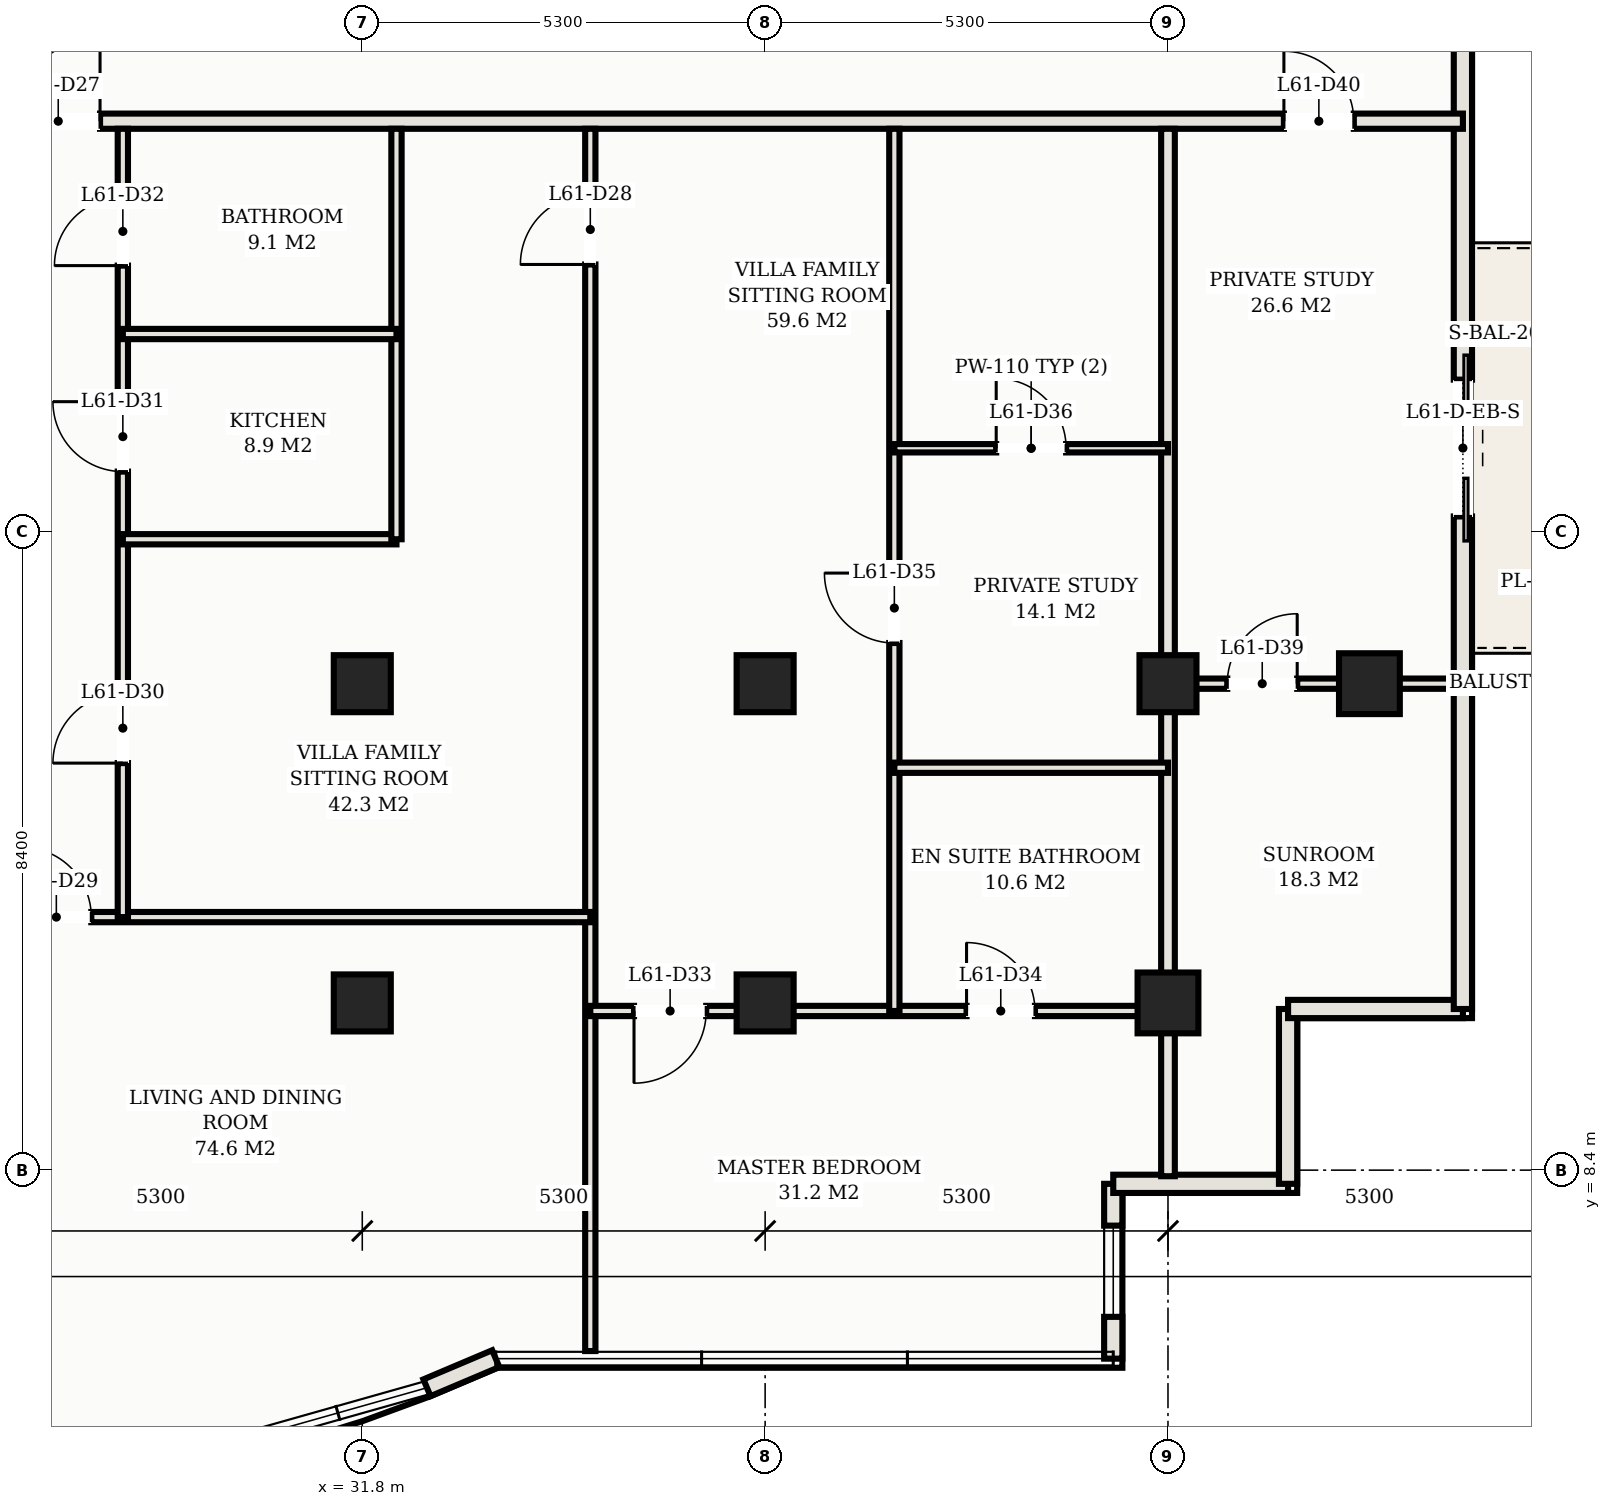
"""IFC4 building model, lengths in metres.
Left out: names, types, materials, properties, quantities, classifications, styles, units other than length and angle.
Written with IfcOpenShell. Run it as: python <this file> out.ifc"""

import sys

from ifc_helpers import new_model, si_unit, direction, frame, frame_2d, origin, origin_2d, place, context, subcontext, project, spatial, rectangle, hollow_rectangle, extrude, element, fill, save


model = new_model("IFC4")
c1 = context("Model", 3, precision=1e-05, world=origin(), true_north=direction((0.0, 1.0)))
c2 = subcontext(c1, "Body", "Model", "MODEL_VIEW")
j1 = project(units=[si_unit("LENGTHUNIT", "METRE"), si_unit("PLANEANGLEUNIT", "RADIAN")], contexts=[c1])
p1 = place(None, origin())
s1 = spatial("IfcSite", under=j1, at=p1, CompositionType="ELEMENT")
p2 = place(p1, origin())
s2 = spatial("IfcBuilding", under=s1, at=p2, CompositionType="ELEMENT")
p3 = place(p2, frame((0.0, 0.0, 223.1)))
s3 = spatial("IfcBuildingStorey", under=s2, at=p3, CompositionType="ELEMENT", Elevation=223.1)
for number, where, z_axis, x_axis in (
    (1, (31.8, 14.8, 0.0), (0.0, 0.0, 1.0), (1.0, 0.0, 0.0)),
    (2, (31.8, 10.6, 0.0), (0.0, 0.0, 1.0), (1.0, 0.0, 0.0)),
    (3, (37.1, 14.8, 0.0), (0.0, 0.0, 1.0), (1.0, 0.0, 0.0)),
    (4, (37.1, 10.6, 0.0), (0.0, 0.0, 1.0), (1.0, 0.0, 0.0)),
    (5, (42.4, 14.8, 0.0), (0.0, 0.0, 1.0), (1.0, 0.0, 0.0)),
):
    element("IfcColumn", number, at=place(p3, frame(where, z_axis=z_axis, x_axis=x_axis)), inside=s3, PredefinedType="COLUMN", context=c2, shape_type="SweptSolid", body=[
        extrude(hollow_rectangle(XDim=0.75, YDim=0.75, WallThickness=0.025, at=origin_2d()), origin(), (0.0, 0.0, 1.0), 3.3),
    ])
for number, where, z_axis, x_axis in (
    (6, (42.4, 10.6, 0.0), (0.0, 0.0, 1.0), (1.0, 0.0, 0.0)),
    (7, (45.05, 14.8, 0.0), (0.0, 0.0, 1.0), (1.0, 0.0, 0.0)),
):
    element("IfcColumn", number, at=place(p3, frame(where, z_axis=z_axis, x_axis=x_axis)), inside=s3, PredefinedType="COLUMN", context=c2, shape_type="SweptSolid", body=[
        extrude(hollow_rectangle(XDim=0.8, YDim=0.8, WallThickness=0.028, at=origin_2d()), origin(), (0.0, 0.0, 1.0), 3.3),
    ])
p4 = place(p3, frame((32.651, 5.537, 0.0), z_axis=(0.0, 0.0, 1.0), x_axis=(0.920998109395, 0.389567044924, 0.0)))
e8 = element("IfcWall", 8, at=p4, inside=s3, PredefinedType="SOLIDWALL", context=c2, shape_type="SweptSolid", body=[
    extrude(rectangle(XDim=0.983, YDim=0.24, at=frame_2d((0.491, 0.0))), origin(), (0.0, 0.0, 1.0), 3.11),
])
p5 = place(p3, frame((41.68, 5.92, 0.0), z_axis=(0.0, 0.0, 1.0), x_axis=(0.0, 1.0, 0.0)))
e9 = element("IfcWall", 9, at=p5, inside=s3, PredefinedType="SOLIDWALL", context=c2, shape_type="SweptSolid", body=[
    extrude(rectangle(XDim=2.3, YDim=0.24, at=frame_2d((1.15, 0.0))), origin(), (0.0, 0.0, 1.0), 3.11),
])
p6 = place(p5, frame((0.55, 0.0, 0.75)))
e10 = element("IfcOpeningElement", 10, at=p6, cuts=e9, PredefinedType="OPENING", context=c2, shape_type="SweptSolid", body=[
    extrude(rectangle(XDim=1.2, YDim=1.5, at=frame_2d((0.6, 0.75))), frame((0.0, 0.13, 0.0), z_axis=(0.0, -1.0, 0.0), x_axis=(1.0, 0.0, 0.0)), (0.0, 0.0, 1.0), 0.26),
])
for number, where, z_axis, x_axis in (
    (11, (41.68, 8.22, 0.0), (0.0, 0.0, 1.0), (1.0, 0.0, 0.0)),
    (12, (43.98, 8.22, 0.0), (0.0, 0.0, 1.0), (0.0, 1.0, 0.0)),
    (13, (43.98, 10.52, 0.0), (0.0, 0.0, 1.0), (1.0, 0.0, 0.0)),
):
    element("IfcWall", number, at=place(p3, frame(where, z_axis=z_axis, x_axis=x_axis)), inside=s3, PredefinedType="SOLIDWALL", context=c2, shape_type="SweptSolid", body=[
        extrude(rectangle(XDim=2.3, YDim=0.24, at=frame_2d((1.15, 0.0))), origin(), (0.0, 0.0, 1.0), 3.11),
    ])
p7 = place(p3, frame((46.28, 10.52, 0.0), z_axis=(0.0, 0.0, 1.0), x_axis=(0.0, 1.0, 0.0)))
e14 = element("IfcWall", 14, at=p7, inside=s3, PredefinedType="SOLIDWALL", context=c2, shape_type="SweptSolid", body=[
    extrude(rectangle(XDim=26.41, YDim=0.24, at=frame_2d((13.205, 0.0))), origin(), (0.0, 0.0, 1.0), 3.11),
])
p8 = place(p7, frame((6.48, 0.0, 0.0)))
e15 = element("IfcOpeningElement", 15, at=p8, cuts=e14, PredefinedType="OPENING", context=c2, shape_type="SweptSolid", body=[
    extrude(rectangle(XDim=1.8, YDim=2.2, at=frame_2d((0.9, 1.1))), frame((0.0, 0.13, 0.0), z_axis=(0.0, -1.0, 0.0), x_axis=(1.0, 0.0, 0.0)), (0.0, 0.0, 1.0), 0.26),
])
p9 = place(p3, frame((6.72, 22.2, 0.0), z_axis=(0.0, 0.0, 1.0), x_axis=(1.0, 0.0, 0.0)))
e16 = element("IfcWall", 16, at=p9, inside=s3, PredefinedType="PARTITIONING", context=c2, shape_type="SweptSolid", body=[
    extrude(rectangle(XDim=39.56, YDim=0.2, at=frame_2d((19.78, 0.0))), origin(), (0.0, 0.0, 1.0), 2.43),
])
p10 = place(p9, frame((4.63, 0.0, 0.0)))
e17 = element("IfcOpeningElement", 17, at=p10, cuts=e16, PredefinedType="OPENING", context=c2, shape_type="SweptSolid", body=[
    extrude(rectangle(XDim=1.1, YDim=2.25, at=frame_2d((0.55, 1.125))), frame((0.0, 0.11, 0.0), z_axis=(0.0, -1.0, 0.0), x_axis=(1.0, 0.0, 0.0)), (0.0, 0.0, 1.0), 0.22),
])
p11 = place(p9, frame((20.53, 0.0, 0.0)))
e18 = element("IfcOpeningElement", 18, at=p11, cuts=e16, PredefinedType="OPENING", context=c2, shape_type="SweptSolid", body=[
    extrude(rectangle(XDim=1.1, YDim=2.25, at=frame_2d((0.55, 1.125))), frame((0.0, 0.11, 0.0), z_axis=(0.0, -1.0, 0.0), x_axis=(1.0, 0.0, 0.0)), (0.0, 0.0, 1.0), 0.22),
])
p12 = place(p9, frame((1.435, 0.0, 0.0)))
e19 = element("IfcOpeningElement", 19, at=p12, cuts=e16, PredefinedType="OPENING", context=c2, shape_type="SweptSolid", body=[
    extrude(rectangle(XDim=0.92, YDim=2.15, at=frame_2d((0.46, 1.075))), frame((0.0, 0.11, 0.0), z_axis=(0.0, -1.0, 0.0), x_axis=(1.0, 0.0, 0.0)), (0.0, 0.0, 1.0), 0.22),
])
p13 = place(p9, frame((37.205, 0.0, 0.0)))
e20 = element("IfcOpeningElement", 20, at=p13, cuts=e16, PredefinedType="OPENING", context=c2, shape_type="SweptSolid", body=[
    extrude(rectangle(XDim=0.92, YDim=2.15, at=frame_2d((0.46, 1.075))), frame((0.0, 0.11, 0.0), z_axis=(0.0, -1.0, 0.0), x_axis=(1.0, 0.0, 0.0)), (0.0, 0.0, 1.0), 0.22),
])
p14 = place(p3, frame((42.4, 8.32, 0.0), z_axis=(0.0, 0.0, 1.0), x_axis=(0.0, 1.0, 0.0)))
e21 = element("IfcWall", 21, at=p14, inside=s3, PredefinedType="PARTITIONING", context=c2, shape_type="SweptSolid", body=[
    extrude(rectangle(XDim=13.78, YDim=0.18, at=frame_2d((6.89, 0.0))), origin(), (0.0, 0.0, 1.0), 2.43),
])
p15 = place(p3, frame((34.8, 6.02, 0.0), z_axis=(0.0, 0.0, 1.0), x_axis=(0.0, 1.0, 0.0)))
e22 = element("IfcWall", 22, at=p15, inside=s3, PredefinedType="PARTITIONING", context=c2, shape_type="SweptSolid", body=[
    extrude(rectangle(XDim=16.08, YDim=0.135, at=frame_2d((8.04, 0.0))), origin(), (0.0, 0.0, 1.0), 2.43),
])
p16 = place(p15, frame((14.295, 0.0, 0.0)))
e23 = element("IfcOpeningElement", 23, at=p16, cuts=e22, PredefinedType="OPENING", context=c2, shape_type="SweptSolid", body=[
    extrude(rectangle(XDim=0.92, YDim=2.15, at=frame_2d((0.46, 1.075))), frame((0.0, 0.078, 0.0), z_axis=(0.0, -1.0, 0.0), x_axis=(1.0, 0.0, 0.0)), (0.0, 0.0, 1.0), 0.155),
])
p17 = place(p3, frame((26.5, 11.729, 0.0), z_axis=(0.0, 0.0, 1.0), x_axis=(1.0, 0.0, 0.0)))
e24 = element("IfcWall", 24, at=p17, inside=s3, PredefinedType="PARTITIONING", context=c2, shape_type="SweptSolid", body=[
    extrude(rectangle(XDim=8.3, YDim=0.135, at=frame_2d((4.15, 0.0))), origin(), (0.0, 0.0, 1.0), 2.43),
])
p18 = place(p17, frame((0.815, 0.0, 0.0)))
e25 = element("IfcOpeningElement", 25, at=p18, cuts=e24, PredefinedType="OPENING", context=c2, shape_type="SweptSolid", body=[
    extrude(rectangle(XDim=0.92, YDim=2.15, at=frame_2d((0.46, 1.075))), frame((0.0, 0.078, 0.0), z_axis=(0.0, -1.0, 0.0), x_axis=(1.0, 0.0, 0.0)), (0.0, 0.0, 1.0), 0.155),
])
p19 = place(p3, frame((28.65, 11.729, 0.0), z_axis=(0.0, 0.0, 1.0), x_axis=(0.0, 1.0, 0.0)))
e26 = element("IfcWall", 26, at=p19, inside=s3, PredefinedType="PARTITIONING", context=c2, shape_type="SweptSolid", body=[
    extrude(rectangle(XDim=10.371, YDim=0.135, at=frame_2d((5.186, 0.0))), origin(), (0.0, 0.0, 1.0), 2.43),
])
p20 = place(p19, frame((2.026, 0.0, 0.0)))
e27 = element("IfcOpeningElement", 27, at=p20, cuts=e26, PredefinedType="OPENING", context=c2, shape_type="SweptSolid", body=[
    extrude(rectangle(XDim=0.92, YDim=2.15, at=frame_2d((0.46, 1.075))), frame((0.0, 0.078, 0.0), z_axis=(0.0, -1.0, 0.0), x_axis=(1.0, 0.0, 0.0)), (0.0, 0.0, 1.0), 0.155),
])
p21 = place(p19, frame((5.861, 0.0, 0.0)))
e28 = element("IfcOpeningElement", 28, at=p21, cuts=e26, PredefinedType="OPENING", context=c2, shape_type="SweptSolid", body=[
    extrude(rectangle(XDim=0.92, YDim=2.15, at=frame_2d((0.46, 1.075))), frame((0.0, 0.078, 0.0), z_axis=(0.0, -1.0, 0.0), x_axis=(1.0, 0.0, 0.0)), (0.0, 0.0, 1.0), 0.155),
])
p22 = place(p19, frame((8.571, 0.0, 0.0)))
e29 = element("IfcOpeningElement", 29, at=p22, cuts=e26, PredefinedType="OPENING", context=c2, shape_type="SweptSolid", body=[
    extrude(rectangle(XDim=0.9, YDim=2.15, at=frame_2d((0.45, 1.075))), frame((0.0, 0.078, 0.0), z_axis=(0.0, -1.0, 0.0), x_axis=(1.0, 0.0, 0.0)), (0.0, 0.0, 1.0), 0.155),
])
p23 = place(p3, frame((28.65, 16.7, 0.0), z_axis=(0.0, 0.0, 1.0), x_axis=(1.0, 0.0, 0.0)))
e30 = element("IfcWall", 30, at=p23, inside=s3, PredefinedType="PARTITIONING", context=c2, shape_type="SweptSolid", body=[
    extrude(rectangle(XDim=3.6, YDim=0.135, at=frame_2d((1.8, 0.0))), origin(), (0.0, 0.0, 1.0), 2.43),
])
p24 = place(p3, frame((32.25, 16.7, 0.0), z_axis=(0.0, 0.0, 1.0), x_axis=(0.0, 1.0, 0.0)))
e31 = element("IfcWall", 31, at=p24, inside=s3, PredefinedType="PARTITIONING", context=c2, shape_type="SweptSolid", body=[
    extrude(rectangle(XDim=5.4, YDim=0.135, at=frame_2d((2.7, 0.0))), origin(), (0.0, 0.0, 1.0), 2.43),
])
p25 = place(p3, frame((28.65, 19.4, 0.0), z_axis=(0.0, 0.0, 1.0), x_axis=(1.0, 0.0, 0.0)))
e32 = element("IfcWall", 32, at=p25, inside=s3, PredefinedType="PARTITIONING", context=c2, shape_type="SweptSolid", body=[
    extrude(rectangle(XDim=3.6, YDim=0.135, at=frame_2d((1.8, 0.0))), origin(), (0.0, 0.0, 1.0), 2.43),
])
p26 = place(p3, frame((34.8, 10.494, 0.0), z_axis=(0.0, 0.0, 1.0), x_axis=(1.0, 0.0, 0.0)))
e33 = element("IfcWall", 33, at=p26, inside=s3, PredefinedType="PARTITIONING", context=c2, shape_type="SweptSolid", body=[
    extrude(rectangle(XDim=7.6, YDim=0.135, at=frame_2d((3.8, 0.0))), origin(), (0.0, 0.0, 1.0), 2.43),
])
p27 = place(p26, frame((0.575, 0.0, 0.0)))
e34 = element("IfcOpeningElement", 34, at=p27, cuts=e33, PredefinedType="OPENING", context=c2, shape_type="SweptSolid", body=[
    extrude(rectangle(XDim=0.95, YDim=2.15, at=frame_2d((0.475, 1.075))), frame((0.0, 0.078, 0.0), z_axis=(0.0, -1.0, 0.0), x_axis=(1.0, 0.0, 0.0)), (0.0, 0.0, 1.0), 0.155),
])
p28 = place(p26, frame((4.95, 0.0, 0.0)))
e35 = element("IfcOpeningElement", 35, at=p28, cuts=e33, PredefinedType="OPENING", context=c2, shape_type="SweptSolid", body=[
    extrude(rectangle(XDim=0.9, YDim=2.15, at=frame_2d((0.45, 1.075))), frame((0.0, 0.078, 0.0), z_axis=(0.0, -1.0, 0.0), x_axis=(1.0, 0.0, 0.0)), (0.0, 0.0, 1.0), 0.155),
])
p29 = place(p3, frame((38.8, 10.494, 0.0), z_axis=(0.0, 0.0, 1.0), x_axis=(0.0, 1.0, 0.0)))
e36 = element("IfcWall", 36, at=p29, inside=s3, PredefinedType="PARTITIONING", context=c2, shape_type="SweptSolid", body=[
    extrude(rectangle(XDim=11.606, YDim=0.135, at=frame_2d((5.803, 0.0))), origin(), (0.0, 0.0, 1.0), 2.43),
])
p30 = place(p29, frame((4.841, 0.0, 0.0)))
e37 = element("IfcOpeningElement", 37, at=p30, cuts=e36, PredefinedType="OPENING", context=c2, shape_type="SweptSolid", body=[
    extrude(rectangle(XDim=0.92, YDim=2.15, at=frame_2d((0.46, 1.075))), frame((0.0, 0.078, 0.0), z_axis=(0.0, -1.0, 0.0), x_axis=(1.0, 0.0, 0.0)), (0.0, 0.0, 1.0), 0.155),
])
p31 = place(p3, frame((38.8, 13.694, 0.0), z_axis=(0.0, 0.0, 1.0), x_axis=(1.0, 0.0, 0.0)))
e38 = element("IfcWall", 38, at=p31, inside=s3, PredefinedType="PARTITIONING", context=c2, shape_type="SweptSolid", body=[
    extrude(rectangle(XDim=3.6, YDim=0.135, at=frame_2d((1.8, 0.0))), origin(), (0.0, 0.0, 1.0), 2.43),
])
p32 = place(p3, frame((38.8, 17.897, 0.0), z_axis=(0.0, 0.0, 1.0), x_axis=(1.0, 0.0, 0.0)))
e39 = element("IfcWall", 39, at=p32, inside=s3, PredefinedType="MOVABLE", context=c2, shape_type="SweptSolid", body=[
    extrude(rectangle(XDim=3.6, YDim=0.11, at=frame_2d((1.8, 0.0))), origin(), (0.0, 0.0, 1.0), 2.43),
])
p33 = place(p32, frame((1.34, 0.0, 0.0)))
e40 = element("IfcOpeningElement", 40, at=p33, cuts=e39, PredefinedType="OPENING", context=c2, shape_type="SweptSolid", body=[
    extrude(rectangle(XDim=0.92, YDim=2.15, at=frame_2d((0.46, 1.075))), frame((0.0, 0.065, 0.0), z_axis=(0.0, -1.0, 0.0), x_axis=(1.0, 0.0, 0.0)), (0.0, 0.0, 1.0), 0.13),
])
p34 = place(p3, frame((42.4, 14.8, 0.0), z_axis=(0.0, 0.0, 1.0), x_axis=(1.0, 0.0, 0.0)))
e41 = element("IfcWall", 41, at=p34, inside=s3, PredefinedType="PARTITIONING", context=c2, shape_type="SweptSolid", body=[
    extrude(rectangle(XDim=3.78, YDim=0.135, at=frame_2d((1.89, 0.0))), origin(), (0.0, 0.0, 1.0), 2.43),
])
p35 = place(p34, frame((0.78, 0.0, 0.0)))
e42 = element("IfcOpeningElement", 42, at=p35, cuts=e41, PredefinedType="OPENING", context=c2, shape_type="SweptSolid", body=[
    extrude(rectangle(XDim=0.92, YDim=2.15, at=frame_2d((0.46, 1.075))), frame((0.0, 0.078, 0.0), z_axis=(0.0, -1.0, 0.0), x_axis=(1.0, 0.0, 0.0)), (0.0, 0.0, 1.0), 0.155),
])
p36 = place(p6, origin())
e43 = element("IfcWindow", 43, at=p36, inside=s3, PartitioningType="SINGLE_PANEL", PredefinedType="WINDOW", context=c2, shape_type="SweptSolid", body=[
    extrude(rectangle(XDim=1.2, YDim=1.5, at=frame_2d((0.6, 0.75))), frame((0.0, 0.03, 0.0), z_axis=(0.0, -1.0, 0.0), x_axis=(1.0, 0.0, 0.0)), (0.0, 0.0, 1.0), 0.06),
])
fill(e10, e43)
p37 = place(p8, frame((1.8, 0.0, 0.0), z_axis=(0.0, 0.0, 1.0), x_axis=(-1.0, 0.0, 0.0)))
e44 = element("IfcDoor", 44, at=p37, inside=s3, OperationType="DOUBLE_DOOR_SLIDING", PredefinedType="DOOR", context=c2, shape_type="SweptSolid", body=[
    extrude(rectangle(XDim=1.8, YDim=2.2, at=frame_2d((0.9, 1.1))), frame((0.0, 0.025, 0.0), z_axis=(0.0, -1.0, 0.0), x_axis=(1.0, 0.0, 0.0)), (0.0, 0.0, 1.0), 0.05),
])
fill(e15, e44)
p38 = place(p11, origin())
e45 = element("IfcDoor", 45, at=p38, inside=s3, OperationType="SINGLE_SWING_RIGHT", PredefinedType="DOOR", context=c2, shape_type="SweptSolid", body=[
    extrude(rectangle(XDim=1.1, YDim=2.25, at=frame_2d((0.55, 1.125))), frame((0.0, 0.025, 0.0), z_axis=(0.0, -1.0, 0.0), x_axis=(1.0, 0.0, 0.0)), (0.0, 0.0, 1.0), 0.05),
])
fill(e18, e45)
p39 = place(p16, origin())
e46 = element("IfcDoor", 46, at=p39, inside=s3, OperationType="SINGLE_SWING_LEFT", PredefinedType="DOOR", context=c2, shape_type="SweptSolid", body=[
    extrude(rectangle(XDim=0.92, YDim=2.15, at=frame_2d((0.46, 1.075))), frame((0.0, 0.025, 0.0), z_axis=(0.0, -1.0, 0.0), x_axis=(1.0, 0.0, 0.0)), (0.0, 0.0, 1.0), 0.05),
])
fill(e23, e46)
p40 = place(p18, origin())
e47 = element("IfcDoor", 47, at=p40, inside=s3, OperationType="SINGLE_SWING_LEFT", PredefinedType="DOOR", context=c2, shape_type="SweptSolid", body=[
    extrude(rectangle(XDim=0.92, YDim=2.15, at=frame_2d((0.46, 1.075))), frame((0.0, 0.025, 0.0), z_axis=(0.0, -1.0, 0.0), x_axis=(1.0, 0.0, 0.0)), (0.0, 0.0, 1.0), 0.05),
])
fill(e25, e47)
p41 = place(p20, origin())
e48 = element("IfcDoor", 48, at=p41, inside=s3, OperationType="SINGLE_SWING_LEFT", PredefinedType="DOOR", context=c2, shape_type="SweptSolid", body=[
    extrude(rectangle(XDim=0.92, YDim=2.15, at=frame_2d((0.46, 1.075))), frame((0.0, 0.025, 0.0), z_axis=(0.0, -1.0, 0.0), x_axis=(1.0, 0.0, 0.0)), (0.0, 0.0, 1.0), 0.05),
])
fill(e27, e48)
p42 = place(p21, origin())
e49 = element("IfcDoor", 49, at=p42, inside=s3, OperationType="SINGLE_SWING_RIGHT", PredefinedType="DOOR", context=c2, shape_type="SweptSolid", body=[
    extrude(rectangle(XDim=0.92, YDim=2.15, at=frame_2d((0.46, 1.075))), frame((0.0, 0.025, 0.0), z_axis=(0.0, -1.0, 0.0), x_axis=(1.0, 0.0, 0.0)), (0.0, 0.0, 1.0), 0.05),
])
fill(e28, e49)
p43 = place(p22, origin())
e50 = element("IfcDoor", 50, at=p43, inside=s3, OperationType="SINGLE_SWING_LEFT", PredefinedType="DOOR", context=c2, shape_type="SweptSolid", body=[
    extrude(rectangle(XDim=0.9, YDim=2.15, at=frame_2d((0.45, 1.075))), frame((0.0, 0.025, 0.0), z_axis=(0.0, -1.0, 0.0), x_axis=(1.0, 0.0, 0.0)), (0.0, 0.0, 1.0), 0.05),
])
fill(e29, e50)
p44 = place(p27, frame((0.95, 0.0, 0.0), z_axis=(0.0, 0.0, 1.0), x_axis=(-1.0, 0.0, 0.0)))
e51 = element("IfcDoor", 51, at=p44, inside=s3, OperationType="SINGLE_SWING_RIGHT", PredefinedType="DOOR", context=c2, shape_type="SweptSolid", body=[
    extrude(rectangle(XDim=0.95, YDim=2.15, at=frame_2d((0.475, 1.075))), frame((0.0, 0.025, 0.0), z_axis=(0.0, -1.0, 0.0), x_axis=(1.0, 0.0, 0.0)), (0.0, 0.0, 1.0), 0.05),
])
fill(e34, e51)
p45 = place(p28, origin())
e52 = element("IfcDoor", 52, at=p45, inside=s3, OperationType="SINGLE_SWING_LEFT", PredefinedType="DOOR", context=c2, shape_type="SweptSolid", body=[
    extrude(rectangle(XDim=0.9, YDim=2.15, at=frame_2d((0.45, 1.075))), frame((0.0, 0.025, 0.0), z_axis=(0.0, -1.0, 0.0), x_axis=(1.0, 0.0, 0.0)), (0.0, 0.0, 1.0), 0.05),
])
fill(e35, e52)
p46 = place(p30, origin())
e53 = element("IfcDoor", 53, at=p46, inside=s3, OperationType="SINGLE_SWING_RIGHT", PredefinedType="DOOR", context=c2, shape_type="SweptSolid", body=[
    extrude(rectangle(XDim=0.92, YDim=2.15, at=frame_2d((0.46, 1.075))), frame((0.0, 0.025, 0.0), z_axis=(0.0, -1.0, 0.0), x_axis=(1.0, 0.0, 0.0)), (0.0, 0.0, 1.0), 0.05),
])
fill(e37, e53)
p47 = place(p33, origin())
e54 = element("IfcDoor", 54, at=p47, inside=s3, OperationType="SINGLE_SWING_LEFT", PredefinedType="DOOR", context=c2, shape_type="SweptSolid", body=[
    extrude(rectangle(XDim=0.92, YDim=2.15, at=frame_2d((0.46, 1.075))), frame((0.0, 0.025, 0.0), z_axis=(0.0, -1.0, 0.0), x_axis=(1.0, 0.0, 0.0)), (0.0, 0.0, 1.0), 0.05),
])
fill(e40, e54)
p48 = place(p35, origin())
e55 = element("IfcDoor", 55, at=p48, inside=s3, OperationType="SINGLE_SWING_RIGHT", PredefinedType="DOOR", context=c2, shape_type="SweptSolid", body=[
    extrude(rectangle(XDim=0.92, YDim=2.15, at=frame_2d((0.46, 1.075))), frame((0.0, 0.025, 0.0), z_axis=(0.0, -1.0, 0.0), x_axis=(1.0, 0.0, 0.0)), (0.0, 0.0, 1.0), 0.05),
])
fill(e42, e55)
p49 = place(p13, origin())
e56 = element("IfcDoor", 56, at=p49, inside=s3, OperationType="SINGLE_SWING_LEFT", PredefinedType="DOOR", context=c2, shape_type="SweptSolid", body=[
    extrude(rectangle(XDim=0.92, YDim=2.15, at=frame_2d((0.46, 1.075))), frame((0.0, 0.025, 0.0), z_axis=(0.0, -1.0, 0.0), x_axis=(1.0, 0.0, 0.0)), (0.0, 0.0, 1.0), 0.05),
])
fill(e20, e56)
save(model, sys.argv[1])
